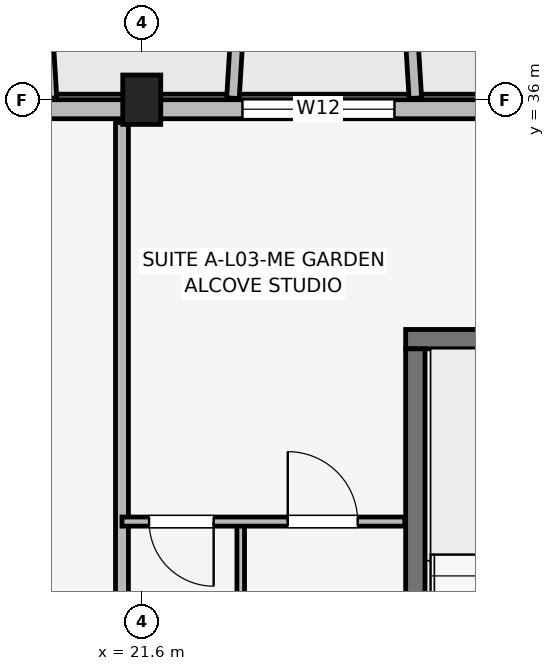
"""IFC4 building model, lengths in metres.
Left out: names, types, materials, properties, quantities, classifications, styles, units other than length and angle.
Written with IfcOpenShell. Run it as: python <this file> out.ifc"""

import sys

from ifc_helpers import new_model, si_unit, direction, frame, frame_2d, origin, origin_2d, place, context, subcontext, project, spatial, rectangle, extrude, element, fill, save


model = new_model("IFC4")
c1 = context("Model", 3, precision=1e-05, world=origin(), true_north=direction((0.0, 1.0)))
c2 = subcontext(c1, "Body", "Model", "MODEL_VIEW")
j1 = project(units=[si_unit("LENGTHUNIT", "METRE"), si_unit("PLANEANGLEUNIT", "RADIAN")], contexts=[c1])
p1 = place(None, origin())
s1 = spatial("IfcSite", under=j1, at=p1, CompositionType="ELEMENT")
p2 = place(p1, origin())
s2 = spatial("IfcBuilding", under=s1, at=p2, CompositionType="ELEMENT")
p3 = place(p2, frame((0.0, 0.0, 11.85)))
s3 = spatial("IfcBuildingStorey", under=s2, at=p3, CompositionType="ELEMENT", Elevation=11.85)
p4 = place(p3, frame((21.6, 36.0, 0.0), z_axis=(0.0, 0.0, 1.0), x_axis=(1.0, 0.0, 0.0)))
e1 = element("IfcColumn", 1, at=p4, inside=s3, PredefinedType="COLUMN", context=c2, shape_type="SweptSolid", body=[
    extrude(rectangle(XDim=0.5, YDim=0.65, at=origin_2d()), origin(), (0.0, 0.0, 1.0), 3.15),
])
p5 = place(p3, frame((25.073, 32.85, 0.0), z_axis=(0.0, 0.0, 1.0), x_axis=(1.0, 0.0, 0.0)))
e2 = element("IfcWall", 2, at=p5, inside=s3, PredefinedType="SHEAR", context=c2, shape_type="SweptSolid", body=[
    extrude(rectangle(XDim=3.305, YDim=0.255, at=frame_2d((1.652, 0.0))), origin(), (0.0, 0.0, 1.0), 3.15),
])
p6 = place(p3, frame((25.2, 26.427, 0.0), z_axis=(0.0, 0.0, 1.0), x_axis=(0.0, 1.0, 0.0)))
e3 = element("IfcWall", 3, at=p6, inside=s3, PredefinedType="SHEAR", context=c2, shape_type="SweptSolid", body=[
    extrude(rectangle(XDim=6.295, YDim=0.255, at=frame_2d((3.147, 0.0))), origin(), (0.0, 0.0, 1.0), 3.15),
])
p7 = place(p3, frame((32.6, 35.875, 0.0), z_axis=(0.0, 0.0, 1.0), x_axis=(-1.0, 0.0, 0.0)))
e4 = element("IfcWall", 4, at=p7, inside=s3, PredefinedType="SOLIDWALL", context=c2, shape_type="SweptSolid", body=[
    extrude(rectangle(XDim=29.2, YDim=0.25, at=frame_2d((14.6, 0.0))), origin(), (0.0, 0.0, 1.0), 2.43),
])
p8 = place(p7, frame((28.625, 0.0, 0.0), z_axis=(0.0, 0.0, 1.0), x_axis=(-1.0, 0.0, 0.0)))
e5 = element("IfcOpeningElement", 5, at=p8, cuts=e4, PredefinedType="OPENING", context=c2, shape_type="SweptSolid", body=[
    extrude(rectangle(XDim=1.65, YDim=2.15, at=frame_2d((0.825, 1.075))), frame((0.0, 0.135, 0.0), z_axis=(0.0, -1.0, 0.0), x_axis=(1.0, 0.0, 0.0)), (0.0, 0.0, 1.0), 0.27),
])
p9 = place(p7, frame((2.3, 0.0, 0.0), z_axis=(0.0, 0.0, 1.0), x_axis=(-1.0, 0.0, 0.0)))
e6 = element("IfcOpeningElement", 6, at=p9, cuts=e4, PredefinedType="OPENING", context=c2, shape_type="SweptSolid", body=[
    extrude(rectangle(XDim=1.8, YDim=2.15, at=frame_2d((0.9, 1.075))), frame((0.0, 0.135, 0.0), z_axis=(0.0, -1.0, 0.0), x_axis=(1.0, 0.0, 0.0)), (0.0, 0.0, 1.0), 0.27),
])
p10 = place(p7, frame((15.03, 0.0, 0.5)))
e7 = element("IfcOpeningElement", 7, at=p10, cuts=e4, PredefinedType="OPENING", context=c2, shape_type="SweptSolid", body=[
    extrude(rectangle(XDim=0.75, YDim=1.75, at=frame_2d((0.375, 0.875))), frame((0.0, 0.135, 0.0), z_axis=(0.0, -1.0, 0.0), x_axis=(1.0, 0.0, 0.0)), (0.0, 0.0, 1.0), 0.27),
])
p11 = place(p7, frame((7.675, 0.0, 0.67)))
e8 = element("IfcOpeningElement", 8, at=p11, cuts=e4, PredefinedType="OPENING", context=c2, shape_type="SweptSolid", body=[
    extrude(rectangle(XDim=2.0, YDim=1.65, at=frame_2d((1.0, 0.825))), frame((0.0, 0.135, 0.0), z_axis=(0.0, -1.0, 0.0), x_axis=(1.0, 0.0, 0.0)), (0.0, 0.0, 1.0), 0.27),
])
p12 = place(p7, frame((19.57, 0.0, 0.7)))
e9 = element("IfcOpeningElement", 9, at=p12, cuts=e4, PredefinedType="OPENING", context=c2, shape_type="SweptSolid", body=[
    extrude(rectangle(XDim=1.86, YDim=1.6, at=frame_2d((0.93, 0.8))), frame((0.0, 0.135, 0.0), z_axis=(0.0, -1.0, 0.0), x_axis=(1.0, 0.0, 0.0)), (0.0, 0.0, 1.0), 0.27),
])
p13 = place(p3, frame((20.4, 36.02, 0.0), z_axis=(0.0, 0.0, 1.0), x_axis=(-0.061046865508, 0.998134900808, 0.0)))
e10 = element("IfcWall", 10, at=p13, inside=s3, PredefinedType="ELEMENTEDWALL", context=c2, shape_type="SweptSolid", body=[
    extrude(rectangle(XDim=1.964, YDim=0.165, at=frame_2d((0.982, 0.0))), origin(), (0.0, 0.0, 1.0), 2.45),
])
for number, where, z_axis, x_axis in (
    (11, (22.8, 36.02, 0.0), (0.0, 0.0, 1.0), (0.061, 0.998, 0.0)),
    (12, (25.2, 36.02, 0.0), (0.0, 0.0, 1.0), (-0.061, 0.998, 0.0)),
):
    element("IfcWall", number, at=place(p3, frame(where, z_axis=z_axis, x_axis=x_axis)), inside=s3, PredefinedType="ELEMENTEDWALL", context=c2, shape_type="SweptSolid", body=[
        extrude(rectangle(XDim=1.964, YDim=0.165, at=frame_2d((0.982, 0.0))), origin(), (0.0, 0.0, 1.0), 2.53),
    ])
p14 = place(p3, frame((21.34, 26.1, 0.0), z_axis=(0.0, 0.0, 1.0), x_axis=(0.0, 1.0, 0.0)))
e13 = element("IfcWall", 13, at=p14, inside=s3, PredefinedType="PARTITIONING", context=c2, shape_type="SweptSolid", body=[
    extrude(rectangle(XDim=9.6, YDim=0.17, at=frame_2d((4.8, 0.0))), origin(), (0.0, 0.0, 1.0), 2.38),
])
p15 = place(p3, frame((22.902, 26.1, 0.0), z_axis=(0.0, 0.0, 1.0), x_axis=(0.0, 1.0, 0.0)))
e14 = element("IfcWall", 14, at=p15, inside=s3, PredefinedType="PARTITIONING", context=c2, shape_type="SweptSolid", body=[
    extrude(rectangle(XDim=4.35, YDim=0.1, at=frame_2d((2.175, 0.0))), origin(), (0.0, 0.0, 1.0), 2.375),
])
p16 = place(p3, frame((21.34, 30.45, 0.0), z_axis=(0.0, 0.0, 1.0), x_axis=(1.0, 0.0, 0.0)))
e15 = element("IfcWall", 15, at=p16, inside=s3, PredefinedType="PARTITIONING", context=c2, shape_type="SweptSolid", body=[
    extrude(rectangle(XDim=3.72, YDim=0.12, at=frame_2d((1.86, 0.0))), origin(), (0.0, 0.0, 1.0), 2.38),
])
p17 = place(p16, frame((1.206, 0.0, 0.0), z_axis=(0.0, 0.0, 1.0), x_axis=(-1.0, 0.0, 0.0)))
e16 = element("IfcOpeningElement", 16, at=p17, cuts=e15, PredefinedType="OPENING", context=c2, shape_type="SweptSolid", body=[
    extrude(rectangle(XDim=0.85, YDim=2.08, at=frame_2d((0.425, 1.04))), frame((0.0, 0.07, 0.0), z_axis=(0.0, -1.0, 0.0), x_axis=(1.0, 0.0, 0.0)), (0.0, 0.0, 1.0), 0.14),
])
p18 = place(p16, frame((2.181, 0.0, 0.0)))
e17 = element("IfcOpeningElement", 17, at=p18, cuts=e15, PredefinedType="OPENING", context=c2, shape_type="SweptSolid", body=[
    extrude(rectangle(XDim=0.92, YDim=2.08, at=frame_2d((0.46, 1.04))), frame((0.0, 0.07, 0.0), z_axis=(0.0, -1.0, 0.0), x_axis=(1.0, 0.0, 0.0)), (0.0, 0.0, 1.0), 0.14),
])
p19 = place(p11, origin())
e18 = element("IfcWindow", 18, at=p19, inside=s3, PartitioningType="SINGLE_PANEL", PredefinedType="WINDOW", context=c2, shape_type="SweptSolid", body=[
    extrude(rectangle(XDim=2.0, YDim=1.65, at=frame_2d((1.0, 0.825))), frame((0.0, 0.03, 0.0), z_axis=(0.0, -1.0, 0.0), x_axis=(1.0, 0.0, 0.0)), (0.0, 0.0, 1.0), 0.06),
])
fill(e8, e18)
p20 = place(p17, origin())
e19 = element("IfcDoor", 19, at=p20, inside=s3, OperationType="SINGLE_SWING_RIGHT", PredefinedType="DOOR", context=c2, shape_type="SweptSolid", body=[
    extrude(rectangle(XDim=0.85, YDim=2.08, at=frame_2d((0.425, 1.04))), frame((0.0, 0.025, 0.0), z_axis=(0.0, -1.0, 0.0), x_axis=(1.0, 0.0, 0.0)), (0.0, 0.0, 1.0), 0.05),
])
fill(e16, e19)
p21 = place(p18, origin())
e20 = element("IfcDoor", 20, at=p21, inside=s3, OperationType="SINGLE_SWING_LEFT", PredefinedType="DOOR", context=c2, shape_type="SweptSolid", body=[
    extrude(rectangle(XDim=0.92, YDim=2.08, at=frame_2d((0.46, 1.04))), frame((0.0, 0.025, 0.0), z_axis=(0.0, -1.0, 0.0), x_axis=(1.0, 0.0, 0.0)), (0.0, 0.0, 1.0), 0.05),
])
fill(e17, e20)
save(model, sys.argv[1])
